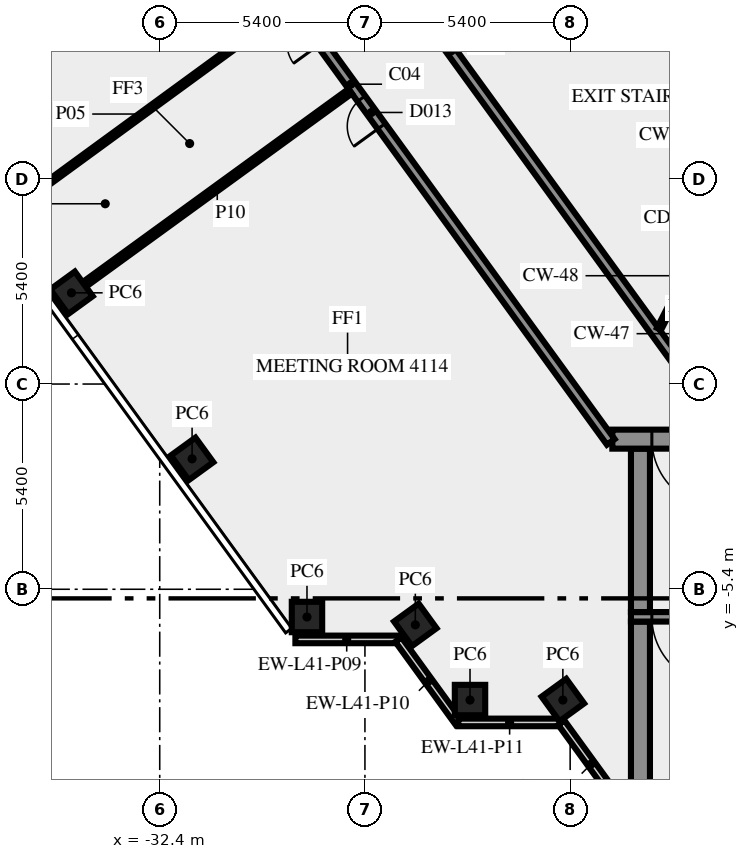
"""IFC4 building model, lengths in metres.
Left out: names, types, materials, properties, quantities, classifications, styles, units other than length and angle.
Written with IfcOpenShell. Run it as: python <this file> out.ifc"""

import sys

from ifc_helpers import new_model, si_unit, direction, frame, frame_2d, origin, origin_2d, place, context, subcontext, project, spatial, rectangle, extrude, element, fill, save


model = new_model("IFC4")
c1 = context("Model", 3, precision=1e-05, world=origin(), true_north=direction((0.0, 1.0)))
c2 = subcontext(c1, "Body", "Model", "MODEL_VIEW")
j1 = project(units=[si_unit("LENGTHUNIT", "METRE"), si_unit("PLANEANGLEUNIT", "RADIAN")], contexts=[c1])
p1 = place(None, origin())
s1 = spatial("IfcSite", under=j1, at=p1, CompositionType="ELEMENT")
p2 = place(p1, origin())
s2 = spatial("IfcBuilding", under=s1, at=p2, CompositionType="ELEMENT")
p3 = place(p2, frame((0.0, 0.0, 176.0)))
s3 = spatial("IfcBuildingStorey", under=s2, at=p3, CompositionType="ELEMENT", Elevation=176.0)
for number, where, z_axis, x_axis in (
    (1, (-34.722, 2.4, 0.0), (0.0, 0.0, 1.0), (0.588, -0.809, 0.0)),
    (2, (-31.548, -1.969, 0.0), (0.0, 0.0, 1.0), (0.588, -0.809, 0.0)),
    (3, (-28.525, -6.13, 0.0), (0.0, 0.0, 1.0), (1.0, 0.0, 0.0)),
    (4, (-25.674, -6.337, 0.0), (0.0, 0.0, 1.0), (0.588, -0.809, 0.0)),
    (5, (-24.235, -8.315, 0.0), (0.0, 0.0, 1.0), (1.0, 0.0, 0.0)),
    (6, (-21.792, -8.315, 0.0), (0.0, 0.0, 1.0), (0.588, -0.809, 0.0)),
):
    element("IfcColumn", number, at=place(p3, frame(where, z_axis=z_axis, x_axis=x_axis)), inside=s3, PredefinedType="COLUMN", context=c2, shape_type="SweptSolid", body=[
        extrude(rectangle(XDim=0.8, YDim=0.8, at=origin_2d()), origin(), (0.0, 0.0, 1.0), 3.65),
    ])
p4 = place(p3, frame((-28.83, -6.719, 0.0), z_axis=(0.0, 0.0, 1.0), x_axis=(1.0, 0.0, 0.0)))
e7 = element("IfcWall", 7, at=p4, inside=s3, PredefinedType="SOLIDWALL", context=c2, shape_type="SweptSolid", body=[
    extrude(rectangle(XDim=2.7, YDim=0.2, at=frame_2d((1.35, 0.0))), origin(), (0.0, 0.0, 1.0), 3.65),
])
p5 = place(p3, frame((-26.12, -6.724, 0.0), z_axis=(0.0, 0.0, 1.0), x_axis=(0.587720002413, -0.809064397168, 0.0)))
e8 = element("IfcWall", 8, at=p5, inside=s3, PredefinedType="SOLIDWALL", context=c2, shape_type="SweptSolid", body=[
    extrude(rectangle(XDim=2.7, YDim=0.2, at=frame_2d((1.35, 0.0))), origin(), (0.0, 0.0, 1.0), 3.65),
])
p6 = place(p3, frame((-24.543, -8.904, 0.0), z_axis=(0.0, 0.0, 1.0), x_axis=(1.0, 0.0, 0.0)))
e9 = element("IfcWall", 9, at=p6, inside=s3, PredefinedType="SOLIDWALL", context=c2, shape_type="SweptSolid", body=[
    extrude(rectangle(XDim=2.7, YDim=0.2, at=frame_2d((1.35, 0.0))), origin(), (0.0, 0.0, 1.0), 3.65),
])
p7 = place(p3, frame((-21.833, -8.909, 0.0), z_axis=(0.0, 0.0, 1.0), x_axis=(0.587766567315, -0.809030569476, 0.0)))
e10 = element("IfcWall", 10, at=p7, inside=s3, PredefinedType="SOLIDWALL", context=c2, shape_type="SweptSolid", body=[
    extrude(rectangle(XDim=2.688, YDim=0.2, at=frame_2d((1.344, 0.0))), origin(), (0.0, 0.0, 1.0), 3.65),
])
p8 = place(p3, frame((-19.75, -10.5, 0.0), z_axis=(0.0, 0.0, 1.0), x_axis=(0.0, 1.0, 0.0)))
e11 = element("IfcWall", 11, at=p8, inside=s3, PredefinedType="SHEAR", context=c2, shape_type="SweptSolid", body=[
    extrude(rectangle(XDim=4.25, YDim=0.5, at=frame_2d((2.125, 0.0))), origin(), (0.0, 0.0, 1.0), 3.65),
])
p9 = place(p3, frame((-9.8, -6.125, 0.0), z_axis=(0.0, 0.0, 1.0), x_axis=(-1.0, 0.0, 0.0)))
e12 = element("IfcWall", 12, at=p9, inside=s3, PredefinedType="SHEAR", context=c2, shape_type="SweptSolid", body=[
    extrude(rectangle(XDim=10.2, YDim=0.25, at=frame_2d((5.1, 0.0))), origin(), (0.0, 0.0, 1.0), 3.65),
])
p10 = place(p9, frame((7.85, 0.0, 0.0)))
e13 = element("IfcOpeningElement", 13, at=p10, cuts=e12, PredefinedType="OPENING", context=c2, shape_type="SweptSolid", body=[
    extrude(rectangle(XDim=1.8, YDim=2.1, at=frame_2d((0.9, 1.05))), frame((0.0, 0.135, 0.0), z_axis=(0.0, -1.0, 0.0), x_axis=(1.0, 0.0, 0.0)), (0.0, 0.0, 1.0), 0.27),
])
p11 = place(p3, frame((-19.75, -6.0, 0.0), z_axis=(0.0, 0.0, 1.0), x_axis=(0.0, 1.0, 0.0)))
e14 = element("IfcWall", 14, at=p11, inside=s3, PredefinedType="SHEAR", context=c2, shape_type="SweptSolid", body=[
    extrude(rectangle(XDim=4.3, YDim=0.5, at=frame_2d((2.15, 0.0))), origin(), (0.0, 0.0, 1.0), 3.65),
])
p12 = place(p3, frame((20.49, -1.45, 0.0), z_axis=(0.0, 0.0, 1.0), x_axis=(-1.0, 0.0, 0.0)))
e15 = element("IfcWall", 15, at=p12, inside=s3, PredefinedType="SHEAR", context=c2, shape_type="SweptSolid", body=[
    extrude(rectangle(XDim=40.98, YDim=0.5, at=frame_2d((20.49, 0.0))), origin(), (0.0, 0.0, 1.0), 3.65),
])
p13 = place(p12, frame((38.14, 0.0, 0.0)))
e16 = element("IfcOpeningElement", 16, at=p13, cuts=e15, PredefinedType="OPENING", context=c2, shape_type="SweptSolid", body=[
    extrude(rectangle(XDim=1.8, YDim=2.1, at=frame_2d((0.9, 1.05))), frame((0.0, 0.26, 0.0), z_axis=(0.0, -1.0, 0.0), x_axis=(1.0, 0.0, 0.0)), (0.0, 0.0, 1.0), 0.52),
])
p14 = place(p12, frame((36.728, 0.0, 0.0)))
e17 = element("IfcOpeningElement", 17, at=p14, cuts=e15, PredefinedType="OPENING", context=c2, shape_type="SweptSolid", body=[
    extrude(rectangle(XDim=0.8, YDim=2.1, at=frame_2d((0.4, 1.05))), frame((0.0, 0.26, 0.0), z_axis=(0.0, -1.0, 0.0), x_axis=(1.0, 0.0, 0.0)), (0.0, 0.0, 1.0), 0.52),
])
p15 = place(p12, frame((35.153, 0.0, 0.0)))
e18 = element("IfcOpeningElement", 18, at=p15, cuts=e15, PredefinedType="OPENING", context=c2, shape_type="SweptSolid", body=[
    extrude(rectangle(XDim=0.8, YDim=2.1, at=frame_2d((0.4, 1.05))), frame((0.0, 0.26, 0.0), z_axis=(0.0, -1.0, 0.0), x_axis=(1.0, 0.0, 0.0)), (0.0, 0.0, 1.0), 0.52),
])
p16 = place(p12, frame((32.94, 0.0, 0.0)))
e19 = element("IfcOpeningElement", 19, at=p16, cuts=e15, PredefinedType="OPENING", context=c2, shape_type="SweptSolid", body=[
    extrude(rectangle(XDim=0.9, YDim=2.1, at=frame_2d((0.45, 1.05))), frame((0.0, 0.26, 0.0), z_axis=(0.0, -1.0, 0.0), x_axis=(1.0, 0.0, 0.0)), (0.0, 0.0, 1.0), 0.52),
])
p17 = place(p12, frame((27.84, 0.0, 0.0)))
e20 = element("IfcOpeningElement", 20, at=p17, cuts=e15, PredefinedType="OPENING", context=c2, shape_type="SweptSolid", body=[
    extrude(rectangle(XDim=0.9, YDim=2.1, at=frame_2d((0.45, 1.05))), frame((0.0, 0.26, 0.0), z_axis=(0.0, -1.0, 0.0), x_axis=(1.0, 0.0, 0.0)), (0.0, 0.0, 1.0), 0.52),
])
p18 = place(p12, frame((21.765, 0.0, 0.0)))
e21 = element("IfcOpeningElement", 21, at=p18, cuts=e15, PredefinedType="OPENING", context=c2, shape_type="SweptSolid", body=[
    extrude(rectangle(XDim=2.0, YDim=2.1, at=frame_2d((1.0, 1.05))), frame((0.0, 0.26, 0.0), z_axis=(0.0, -1.0, 0.0), x_axis=(1.0, 0.0, 0.0)), (0.0, 0.0, 1.0), 0.52),
])
p19 = place(p12, frame((7.14, 0.0, 0.0)))
e22 = element("IfcOpeningElement", 22, at=p19, cuts=e15, PredefinedType="OPENING", context=c2, shape_type="SweptSolid", body=[
    extrude(rectangle(XDim=0.9, YDim=2.1, at=frame_2d((0.45, 1.05))), frame((0.0, 0.26, 0.0), z_axis=(0.0, -1.0, 0.0), x_axis=(1.0, 0.0, 0.0)), (0.0, 0.0, 1.0), 0.52),
])
p20 = place(p12, frame((4.19, 0.0, 0.0)))
e23 = element("IfcOpeningElement", 23, at=p20, cuts=e15, PredefinedType="OPENING", context=c2, shape_type="SweptSolid", body=[
    extrude(rectangle(XDim=0.9, YDim=2.1, at=frame_2d((0.45, 1.05))), frame((0.0, 0.26, 0.0), z_axis=(0.0, -1.0, 0.0), x_axis=(1.0, 0.0, 0.0)), (0.0, 0.0, 1.0), 0.52),
])
p21 = place(p12, frame((1.04, 0.0, 0.0)))
e24 = element("IfcOpeningElement", 24, at=p21, cuts=e15, PredefinedType="OPENING", context=c2, shape_type="SweptSolid", body=[
    extrude(rectangle(XDim=1.8, YDim=2.1, at=frame_2d((0.9, 1.05))), frame((0.0, 0.26, 0.0), z_axis=(0.0, -1.0, 0.0), x_axis=(1.0, 0.0, 0.0)), (0.0, 0.0, 1.0), 0.52),
])
p22 = place(p3, frame((-20.531, -1.523, 0.0), z_axis=(0.0, 0.0, 1.0), x_axis=(-0.587784239999, 0.809017729849, 0.0)))
e25 = element("IfcWall", 25, at=p22, inside=s3, PredefinedType="SOLIDWALL", context=c2, shape_type="SweptSolid", body=[
    extrude(rectangle(XDim=23.271, YDim=0.25, at=frame_2d((11.635, 0.0))), origin(), (0.0, 0.0, 1.0), 3.65),
])
p23 = place(p22, frame((18.366, 0.0, 0.0)))
e26 = element("IfcOpeningElement", 26, at=p23, cuts=e25, PredefinedType="OPENING", context=c2, shape_type="SweptSolid", body=[
    extrude(rectangle(XDim=0.9, YDim=2.1, at=frame_2d((0.45, 1.05))), frame((0.0, 0.135, 0.0), z_axis=(0.0, -1.0, 0.0), x_axis=(1.0, 0.0, 0.0)), (0.0, 0.0, 1.0), 0.27),
])
p24 = place(p22, frame((10.266, 0.0, 0.0)))
e27 = element("IfcOpeningElement", 27, at=p24, cuts=e25, PredefinedType="OPENING", context=c2, shape_type="SweptSolid", body=[
    extrude(rectangle(XDim=0.9, YDim=2.1, at=frame_2d((0.45, 1.05))), frame((0.0, 0.135, 0.0), z_axis=(0.0, -1.0, 0.0), x_axis=(1.0, 0.0, 0.0)), (0.0, 0.0, 1.0), 0.27),
])
p25 = place(p22, frame((21.896, 0.0, 0.0)))
e28 = element("IfcOpeningElement", 28, at=p25, cuts=e25, PredefinedType="OPENING", context=c2, shape_type="SweptSolid", body=[
    extrude(rectangle(XDim=0.9, YDim=2.1, at=frame_2d((0.45, 1.05))), frame((0.0, 0.135, 0.0), z_axis=(0.0, -1.0, 0.0), x_axis=(1.0, 0.0, 0.0)), (0.0, 0.0, 1.0), 0.27),
])
p26 = place(p22, frame((12.966, 0.0, 0.0)))
e29 = element("IfcOpeningElement", 29, at=p26, cuts=e25, PredefinedType="OPENING", context=c2, shape_type="SweptSolid", body=[
    extrude(rectangle(XDim=0.9, YDim=2.1, at=frame_2d((0.45, 1.05))), frame((0.0, 0.135, 0.0), z_axis=(0.0, -1.0, 0.0), x_axis=(1.0, 0.0, 0.0)), (0.0, 0.0, 1.0), 0.27),
])
p27 = place(p3, frame((-31.918, 18.658, 0.0), z_axis=(0.0, 0.0, 1.0), x_axis=(0.587788731405, -0.80901446664, 0.0)))
e30 = element("IfcWall", 30, at=p27, inside=s3, PredefinedType="SOLIDWALL", context=c2, shape_type="SweptSolid", body=[
    extrude(rectangle(XDim=24.453, YDim=0.25, at=frame_2d((12.227, 0.0))), origin(), (0.0, 0.0, 1.0), 3.65),
])
p28 = place(p27, frame((0.224, 0.0, 0.0)))
e31 = element("IfcOpeningElement", 31, at=p28, cuts=e30, PredefinedType="OPENING", context=c2, shape_type="SweptSolid", body=[
    extrude(rectangle(XDim=0.9, YDim=2.1, at=frame_2d((0.45, 1.05))), frame((0.0, 0.135, 0.0), z_axis=(0.0, -1.0, 0.0), x_axis=(1.0, 0.0, 0.0)), (0.0, 0.0, 1.0), 0.27),
])
p29 = place(p3, frame((-32.15, 14.256, 0.0), z_axis=(0.0, 0.0, 1.0), x_axis=(-0.809064299351, -0.587720137068, 0.0)))
e32 = element("IfcWall", 32, at=p29, inside=s3, PredefinedType="SOLIDWALL", context=c2, shape_type="SweptSolid", body=[
    extrude(rectangle(XDim=9.55, YDim=0.2, at=frame_2d((4.775, 0.0))), origin(), (0.0, 0.0, 1.0), 2.85),
])
p30 = place(p3, frame((-36.712, 4.288, 0.0), z_axis=(0.0, 0.0, 1.0), x_axis=(0.807606997933, 0.589721067023, 0.0)))
e33 = element("IfcWall", 33, at=p30, inside=s3, PredefinedType="PARTITIONING", context=c2, shape_type="SweptSolid", body=[
    extrude(rectangle(XDim=9.55, YDim=0.12, at=frame_2d((4.775, 0.0))), origin(), (0.0, 0.0, 1.0), 2.85),
])
p31 = place(p3, frame((-27.389, 7.703, 0.0), z_axis=(0.0, 0.0, 1.0), x_axis=(-0.809060825193, -0.587724919617, 0.0)))
e34 = element("IfcWall", 34, at=p31, inside=s3, PredefinedType="PARTITIONING", context=c2, shape_type="SweptSolid", body=[
    extrude(rectangle(XDim=8.645, YDim=0.15, at=frame_2d((4.322, 0.0))), origin(), (0.0, 0.0, 1.0), 3.65),
])
p32 = place(p3, frame((-19.261, 1.45, 0.0), z_axis=(0.0, 0.0, 1.0), x_axis=(0.453950796792, 0.891026752736, 0.0)))
e35 = element("IfcWall", 35, at=p32, inside=s3, PredefinedType="PARTITIONING", context=c2, shape_type="SweptSolid", body=[
    extrude(rectangle(XDim=2.778, YDim=0.12, at=frame_2d((1.389, 0.0))), origin(), (0.0, 0.0, 1.0), 3.65),
])
p33 = place(p10, origin())
e36 = element("IfcDoor", 36, at=p33, inside=s3, OperationType="DOUBLE_DOOR_SINGLE_SWING", PredefinedType="DOOR", context=c2, shape_type="SweptSolid", body=[
    extrude(rectangle(XDim=1.8, YDim=2.1, at=frame_2d((0.9, 1.05))), frame((0.0, 0.025, 0.0), z_axis=(0.0, -1.0, 0.0), x_axis=(1.0, 0.0, 0.0)), (0.0, 0.0, 1.0), 0.05),
])
fill(e13, e36)
p34 = place(p13, origin())
e37 = element("IfcDoor", 37, at=p34, inside=s3, OperationType="DOUBLE_DOOR_SINGLE_SWING", PredefinedType="DOOR", context=c2, shape_type="SweptSolid", body=[
    extrude(rectangle(XDim=1.8, YDim=2.1, at=frame_2d((0.9, 1.05))), frame((0.0, 0.025, 0.0), z_axis=(0.0, -1.0, 0.0), x_axis=(1.0, 0.0, 0.0)), (0.0, 0.0, 1.0), 0.05),
])
fill(e16, e37)
p35 = place(p24, origin())
e38 = element("IfcDoor", 38, at=p35, inside=s3, OperationType="SINGLE_SWING_RIGHT", PredefinedType="DOOR", context=c2, shape_type="SweptSolid", body=[
    extrude(rectangle(XDim=0.9, YDim=2.1, at=frame_2d((0.45, 1.05))), frame((0.0, 0.025, 0.0), z_axis=(0.0, -1.0, 0.0), x_axis=(1.0, 0.0, 0.0)), (0.0, 0.0, 1.0), 0.05),
])
fill(e27, e38)
save(model, sys.argv[1])
